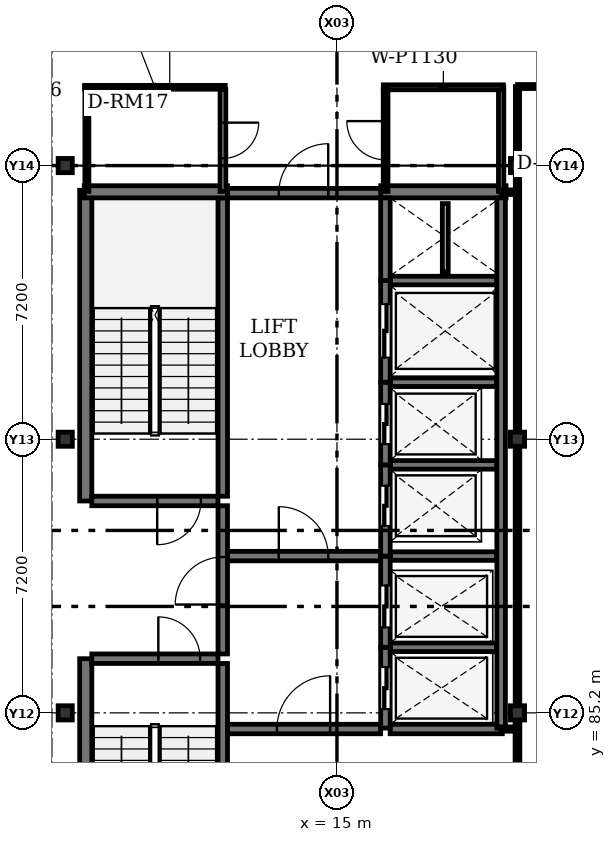
"""IFC4 building model, lengths in metres.
Left out: names, types, materials, properties, quantities, classifications, styles, units other than length and angle.
Written with IfcOpenShell. Run it as: python <this file> out.ifc"""

import sys

from ifc_helpers import new_model, si_unit, direction, frame, frame_2d, origin, origin_2d, place, context, subcontext, project, spatial, rectangle, i_section, extrude, element, fill, save


model = new_model("IFC4")
c1 = context("Model", 3, precision=1e-05, world=origin(), true_north=direction((0.0, 1.0)))
c2 = subcontext(c1, "Body", "Model", "MODEL_VIEW")
j1 = project(units=[si_unit("LENGTHUNIT", "METRE"), si_unit("PLANEANGLEUNIT", "RADIAN")], contexts=[c1])
p1 = place(None, origin())
s1 = spatial("IfcSite", under=j1, at=p1, CompositionType="ELEMENT")
p2 = place(p1, origin())
s2 = spatial("IfcBuilding", under=s1, at=p2, CompositionType="ELEMENT")
p3 = place(p2, frame((0.0, 0.0, 22.5)))
s3 = spatial("IfcBuildingStorey", under=s2, at=p3, CompositionType="ELEMENT", Elevation=22.5)
for number, where, z_axis, x_axis in (
    (1, (7.85, 85.2, 0.0), (0.0, 0.0, 1.0), (0.0, 1.0, 0.0)),
    (2, (19.75, 85.2, 0.0), (0.0, 0.0, 1.0), (0.0, 1.0, 0.0)),
    (3, (7.85, 92.4, 0.0), (0.0, 0.0, 1.0), (1.0, 0.0, 0.0)),
    (4, (19.75, 92.4, 0.0), (0.0, 0.0, 1.0), (1.0, 0.0, 0.0)),
    (5, (7.85, 99.6, 0.0), (0.0, 0.0, 1.0), (0.0, 1.0, 0.0)),
    (6, (19.75, 99.6, 0.0), (0.0, 0.0, 1.0), (0.0, 1.0, 0.0)),
):
    element("IfcColumn", number, at=place(p3, frame(where, z_axis=z_axis, x_axis=x_axis)), inside=s3, PredefinedType="COLUMN", context=c2, shape_type="SweptSolid", body=[
        extrude(i_section(OverallWidth=0.374, OverallDepth=0.372, WebThickness=0.016, FlangeThickness=0.026, FilletRadius=0.015, at=origin_2d()), origin(), (0.0, 0.0, 1.0), 4.2),
    ])
for number, where, z_axis, x_axis in (
    (7, (8.39, 78.45, 0.0), (0.0, 0.0, 1.0), (0.0, 1.0, 0.0)),
    (8, (8.39, 90.775, 0.0), (0.0, 0.0, 1.0), (0.0, 1.0, 0.0)),
):
    element("IfcWall", number, at=place(p3, frame(where, z_axis=z_axis, x_axis=x_axis)), inside=s3, PredefinedType="SHEAR", context=c2, shape_type="SweptSolid", body=[
        extrude(rectangle(XDim=8.175, YDim=0.32, at=frame_2d((4.087, 0.0))), origin(), (0.0, 0.0, 1.0), 4.2),
    ])
for number, where, z_axis, x_axis in (
    (9, (11.995, 78.65, 0.0), (0.0, 0.0, 1.0), (0.0, 1.0, 0.0)),
    (10, (11.995, 90.9, 0.0), (0.0, 0.0, 1.0), (0.0, 1.0, 0.0)),
):
    element("IfcWall", number, at=place(p3, frame(where, z_axis=z_axis, x_axis=x_axis)), inside=s3, PredefinedType="SHEAR", context=c2, shape_type="SweptSolid", body=[
        extrude(rectangle(XDim=7.85, YDim=0.25, at=frame_2d((3.925, 0.0))), origin(), (0.0, 0.0, 1.0), 4.2),
    ])
p4 = place(p3, frame((11.995, 86.75, 0.0), z_axis=(0.0, 0.0, 1.0), x_axis=(0.0, 1.0, 0.0)))
e11 = element("IfcWall", 11, at=p4, inside=s3, PredefinedType="SHEAR", context=c2, shape_type="SweptSolid", body=[
    extrude(rectangle(XDim=3.9, YDim=0.25, at=frame_2d((1.95, 0.0))), origin(), (0.0, 0.0, 1.0), 4.2),
])
p5 = place(p4, frame((1.3, 0.0, 0.0)))
e12 = element("IfcOpeningElement", 12, at=p5, cuts=e11, PredefinedType="OPENING", context=c2, shape_type="SweptSolid", body=[
    extrude(rectangle(XDim=1.25, YDim=2.2, at=frame_2d((0.625, 1.1))), frame((0.0, 0.125, 0.0), z_axis=(0.0, -1.0, 0.0), x_axis=(1.0, 0.0, 0.0)), (0.0, 0.0, 1.0), 0.25),
])
p6 = place(p3, frame((8.35, 98.91, 0.0), z_axis=(0.0, 0.0, 1.0), x_axis=(1.0, 0.0, 0.0)))
e13 = element("IfcWall", 13, at=p6, inside=s3, PredefinedType="SHEAR", context=c2, shape_type="SweptSolid", body=[
    extrude(rectangle(XDim=3.77, YDim=0.32, at=frame_2d((1.885, 0.0))), origin(), (0.0, 0.0, 1.0), 4.2),
])
p7 = place(p3, frame((16.15, 98.91, 0.0), z_axis=(0.0, 0.0, 1.0), x_axis=(1.0, 0.0, 0.0)))
e14 = element("IfcWall", 14, at=p7, inside=s3, PredefinedType="SHEAR", context=c2, shape_type="SweptSolid", body=[
    extrude(rectangle(XDim=3.3, YDim=0.32, at=frame_2d((1.65, 0.0))), origin(), (0.0, 0.0, 1.0), 4.2),
])
p8 = place(p3, frame((12.12, 98.875, 0.0), z_axis=(0.0, 0.0, 1.0), x_axis=(1.0, 0.0, 0.0)))
e15 = element("IfcWall", 15, at=p8, inside=s3, PredefinedType="SHEAR", context=c2, shape_type="SweptSolid", body=[
    extrude(rectangle(XDim=4.03, YDim=0.25, at=frame_2d((2.015, 0.0))), origin(), (0.0, 0.0, 1.0), 4.2),
])
p9 = place(p8, frame((1.35, 0.0, 0.0)))
e16 = element("IfcOpeningElement", 16, at=p9, cuts=e15, PredefinedType="OPENING", context=c2, shape_type="SweptSolid", body=[
    extrude(rectangle(XDim=1.3, YDim=2.2, at=frame_2d((0.65, 1.1))), frame((0.0, 0.125, 0.0), z_axis=(0.0, -1.0, 0.0), x_axis=(1.0, 0.0, 0.0)), (0.0, 0.0, 1.0), 0.25),
])
p10 = place(p3, frame((8.55, 86.625, 0.0), z_axis=(0.0, 0.0, 1.0), x_axis=(1.0, 0.0, 0.0)))
e17 = element("IfcWall", 17, at=p10, inside=s3, PredefinedType="SHEAR", context=c2, shape_type="SweptSolid", body=[
    extrude(rectangle(XDim=3.32, YDim=0.25, at=frame_2d((1.66, 0.0))), origin(), (0.0, 0.0, 1.0), 4.2),
])
p11 = place(p10, frame((1.75, 0.0, 0.0)))
e18 = element("IfcOpeningElement", 18, at=p11, cuts=e17, PredefinedType="OPENING", context=c2, shape_type="SweptSolid", body=[
    extrude(rectangle(XDim=1.1, YDim=2.15, at=frame_2d((0.55, 1.075))), frame((0.0, 0.125, 0.0), z_axis=(0.0, -1.0, 0.0), x_axis=(1.0, 0.0, 0.0)), (0.0, 0.0, 1.0), 0.25),
])
p12 = place(p3, frame((11.87, 90.775, 0.0), z_axis=(0.0, 0.0, 1.0), x_axis=(-1.0, 0.0, 0.0)))
e19 = element("IfcWall", 19, at=p12, inside=s3, PredefinedType="SHEAR", context=c2, shape_type="SweptSolid", body=[
    extrude(rectangle(XDim=3.32, YDim=0.25, at=frame_2d((1.66, 0.0))), origin(), (0.0, 0.0, 1.0), 4.2),
])
p13 = place(p12, frame((0.45, 0.0, 0.0)))
e20 = element("IfcOpeningElement", 20, at=p13, cuts=e19, PredefinedType="OPENING", context=c2, shape_type="SweptSolid", body=[
    extrude(rectangle(XDim=1.15, YDim=2.15, at=frame_2d((0.575, 1.075))), frame((0.0, 0.125, 0.0), z_axis=(0.0, -1.0, 0.0), x_axis=(1.0, 0.0, 0.0)), (0.0, 0.0, 1.0), 0.25),
])
p14 = place(p3, frame((12.12, 89.325, 0.0), z_axis=(0.0, 0.0, 1.0), x_axis=(1.0, 0.0, 0.0)))
e21 = element("IfcWall", 21, at=p14, inside=s3, PredefinedType="SHEAR", context=c2, shape_type="SweptSolid", body=[
    extrude(rectangle(XDim=4.03, YDim=0.25, at=frame_2d((2.015, 0.0))), origin(), (0.0, 0.0, 1.0), 4.2),
])
p15 = place(p14, frame((1.35, 0.0, 0.0)))
e22 = element("IfcOpeningElement", 22, at=p15, cuts=e21, PredefinedType="OPENING", context=c2, shape_type="SweptSolid", body=[
    extrude(rectangle(XDim=1.3, YDim=2.2, at=frame_2d((0.65, 1.1))), frame((0.0, 0.125, 0.0), z_axis=(0.0, -1.0, 0.0), x_axis=(1.0, 0.0, 0.0)), (0.0, 0.0, 1.0), 0.25),
])
p16 = place(p3, frame((12.12, 84.775, 0.0), z_axis=(0.0, 0.0, 1.0), x_axis=(1.0, 0.0, 0.0)))
e23 = element("IfcWall", 23, at=p16, inside=s3, PredefinedType="SHEAR", context=c2, shape_type="SweptSolid", body=[
    extrude(rectangle(XDim=4.03, YDim=0.25, at=frame_2d((2.015, 0.0))), origin(), (0.0, 0.0, 1.0), 4.2),
])
p17 = place(p16, frame((1.3, 0.0, 0.0)))
e24 = element("IfcOpeningElement", 24, at=p17, cuts=e23, PredefinedType="OPENING", context=c2, shape_type="SweptSolid", body=[
    extrude(rectangle(XDim=1.4, YDim=2.25, at=frame_2d((0.7, 1.125))), frame((0.0, 0.125, 0.0), z_axis=(0.0, -1.0, 0.0), x_axis=(1.0, 0.0, 0.0)), (0.0, 0.0, 1.0), 0.25),
])
p18 = place(p3, frame((16.4, 84.775, 0.0), z_axis=(0.0, 0.0, 1.0), x_axis=(1.0, 0.0, 0.0)))
e25 = element("IfcWall", 25, at=p18, inside=s3, PredefinedType="SHEAR", context=c2, shape_type="SweptSolid", body=[
    extrude(rectangle(XDim=2.95, YDim=0.25, at=frame_2d((1.475, 0.0))), origin(), (0.0, 0.0, 1.0), 4.2),
])
p19 = place(p3, frame((19.32, 84.8, 0.0), z_axis=(0.0, 0.0, 1.0), x_axis=(0.0, 1.0, 0.0)))
e26 = element("IfcWall", 26, at=p19, inside=s3, PredefinedType="SHEAR", context=c2, shape_type="SweptSolid", body=[
    extrude(rectangle(XDim=13.95, YDim=0.225, at=frame_2d((6.975, 0.0))), origin(), (0.0, 0.0, 1.0), 4.2),
])
for number, where, z_axis, x_axis in (
    (27, (16.4, 86.925, 0.0), (0.0, 0.0, 1.0), (1.0, 0.0, 0.0)),
    (28, (16.4, 89.325, 0.0), (0.0, 0.0, 1.0), (1.0, 0.0, 0.0)),
    (29, (16.4, 91.725, 0.0), (0.0, 0.0, 1.0), (1.0, 0.0, 0.0)),
    (30, (16.4, 93.9, 0.0), (0.0, 0.0, 1.0), (1.0, 0.0, 0.0)),
    (31, (16.4, 96.575, 0.0), (0.0, 0.0, 1.0), (1.0, 0.0, 0.0)),
):
    element("IfcWall", number, at=place(p3, frame(where, z_axis=z_axis, x_axis=x_axis)), inside=s3, PredefinedType="SHEAR", context=c2, shape_type="SweptSolid", body=[
        extrude(rectangle(XDim=2.8, YDim=0.225, at=frame_2d((1.4, 0.0))), origin(), (0.0, 0.0, 1.0), 4.2),
    ])
p20 = place(p3, frame((16.275, 84.8, 0.0), z_axis=(0.0, 0.0, 1.0), x_axis=(0.0, 1.0, 0.0)))
e32 = element("IfcWall", 32, at=p20, inside=s3, PredefinedType="SHEAR", context=c2, shape_type="SweptSolid", body=[
    extrude(rectangle(XDim=2.125, YDim=0.25, at=frame_2d((1.062, 0.0))), origin(), (0.0, 0.0, 1.0), 4.2),
])
p21 = place(p20, frame((0.5, 0.0, 0.0)))
e33 = element("IfcOpeningElement", 33, at=p21, cuts=e32, PredefinedType="OPENING", context=c2, shape_type="SweptSolid", body=[
    extrude(rectangle(XDim=1.1, YDim=2.15, at=frame_2d((0.55, 1.075))), frame((0.0, 0.125, 0.0), z_axis=(0.0, -1.0, 0.0), x_axis=(1.0, 0.0, 0.0)), (0.0, 0.0, 1.0), 0.25),
])
p22 = place(p3, frame((16.275, 86.925, 0.0), z_axis=(0.0, 0.0, 1.0), x_axis=(0.0, 1.0, 0.0)))
e34 = element("IfcWall", 34, at=p22, inside=s3, PredefinedType="SHEAR", context=c2, shape_type="SweptSolid", body=[
    extrude(rectangle(XDim=2.4, YDim=0.25, at=frame_2d((1.2, 0.0))), origin(), (0.0, 0.0, 1.0), 4.2),
])
p23 = place(p22, frame((0.525, 0.0, 0.0)))
e35 = element("IfcOpeningElement", 35, at=p23, cuts=e34, PredefinedType="OPENING", context=c2, shape_type="SweptSolid", body=[
    extrude(rectangle(XDim=1.1, YDim=2.15, at=frame_2d((0.55, 1.075))), frame((0.0, 0.125, 0.0), z_axis=(0.0, -1.0, 0.0), x_axis=(1.0, 0.0, 0.0)), (0.0, 0.0, 1.0), 0.25),
])
p24 = place(p3, frame((16.275, 89.325, 0.0), z_axis=(0.0, 0.0, 1.0), x_axis=(0.0, 1.0, 0.0)))
e36 = element("IfcWall", 36, at=p24, inside=s3, PredefinedType="SHEAR", context=c2, shape_type="SweptSolid", body=[
    extrude(rectangle(XDim=2.4, YDim=0.25, at=frame_2d((1.2, 0.0))), origin(), (0.0, 0.0, 1.0), 4.2),
])
p25 = place(p24, frame((0.8, 0.0, 0.0)))
e37 = element("IfcOpeningElement", 37, at=p25, cuts=e36, PredefinedType="OPENING", context=c2, shape_type="SweptSolid", body=[
    extrude(rectangle(XDim=1.05, YDim=2.15, at=frame_2d((0.525, 1.075))), frame((0.0, 0.125, 0.0), z_axis=(0.0, -1.0, 0.0), x_axis=(1.0, 0.0, 0.0)), (0.0, 0.0, 1.0), 0.25),
])
p26 = place(p3, frame((16.275, 91.725, 0.0), z_axis=(0.0, 0.0, 1.0), x_axis=(0.0, 1.0, 0.0)))
e38 = element("IfcWall", 38, at=p26, inside=s3, PredefinedType="SHEAR", context=c2, shape_type="SweptSolid", body=[
    extrude(rectangle(XDim=2.175, YDim=0.25, at=frame_2d((1.087, 0.0))), origin(), (0.0, 0.0, 1.0), 4.2),
])
p27 = place(p26, frame((0.55, 0.0, 0.0)))
e39 = element("IfcOpeningElement", 39, at=p27, cuts=e38, PredefinedType="OPENING", context=c2, shape_type="SweptSolid", body=[
    extrude(rectangle(XDim=1.05, YDim=2.15, at=frame_2d((0.525, 1.075))), frame((0.0, 0.125, 0.0), z_axis=(0.0, -1.0, 0.0), x_axis=(1.0, 0.0, 0.0)), (0.0, 0.0, 1.0), 0.25),
])
p28 = place(p3, frame((16.275, 93.9, 0.0), z_axis=(0.0, 0.0, 1.0), x_axis=(0.0, 1.0, 0.0)))
e40 = element("IfcWall", 40, at=p28, inside=s3, PredefinedType="SHEAR", context=c2, shape_type="SweptSolid", body=[
    extrude(rectangle(XDim=2.675, YDim=0.25, at=frame_2d((1.337, 0.0))), origin(), (0.0, 0.0, 1.0), 4.2),
])
p29 = place(p28, frame((0.65, 0.0, 0.0)))
e41 = element("IfcOpeningElement", 41, at=p29, cuts=e40, PredefinedType="OPENING", context=c2, shape_type="SweptSolid", body=[
    extrude(rectangle(XDim=1.4, YDim=2.25, at=frame_2d((0.7, 1.125))), frame((0.0, 0.125, 0.0), z_axis=(0.0, -1.0, 0.0), x_axis=(1.0, 0.0, 0.0)), (0.0, 0.0, 1.0), 0.25),
])
p30 = place(p3, frame((16.275, 96.575, 0.0), z_axis=(0.0, 0.0, 1.0), x_axis=(0.0, 1.0, 0.0)))
e42 = element("IfcWall", 42, at=p30, inside=s3, PredefinedType="SHEAR", context=c2, shape_type="SweptSolid", body=[
    extrude(rectangle(XDim=2.175, YDim=0.25, at=frame_2d((1.087, 0.0))), origin(), (0.0, 0.0, 1.0), 4.2),
])
p31 = place(p3, frame((17.85, 96.8, 0.0), z_axis=(0.0, 0.0, 1.0), x_axis=(0.0, 1.0, 0.0)))
e43 = element("IfcWall", 43, at=p31, inside=s3, PredefinedType="PLUMBINGWALL", context=c2, shape_type="SweptSolid", body=[
    extrude(rectangle(XDim=1.8, YDim=0.155, at=frame_2d((0.9, 0.0))), origin(), (0.0, 0.0, 1.0), 4.2),
])
p32 = place(p3, frame((8.42, 98.92, 0.0), z_axis=(0.0, 0.0, 1.0), x_axis=(0.0, 1.0, 0.0)))
e44 = element("IfcWall", 44, at=p32, inside=s3, PredefinedType="PARTITIONING", context=c2, shape_type="SweptSolid", body=[
    extrude(rectangle(XDim=2.74, YDim=0.105, at=frame_2d((1.37, 0.0))), origin(), (0.0, 0.0, 1.0), 3.277),
])
p33 = place(p3, frame((8.36, 101.66, 0.0), z_axis=(0.0, 0.0, 1.0), x_axis=(1.0, 0.0, 0.0)))
e45 = element("IfcWall", 45, at=p33, inside=s3, PredefinedType="PARTITIONING", context=c2, shape_type="SweptSolid", body=[
    extrude(rectangle(XDim=3.7, YDim=0.1, at=frame_2d((1.85, 0.0))), origin(), (0.0, 0.0, 1.0), 3.95),
])
p34 = place(p3, frame((12.0, 101.6, 0.0), z_axis=(0.0, 0.0, 1.0), x_axis=(0.0, -1.0, 0.0)))
e46 = element("IfcWall", 46, at=p34, inside=s3, PredefinedType="PARTITIONING", context=c2, shape_type="SweptSolid", body=[
    extrude(rectangle(XDim=2.68, YDim=0.15, at=frame_2d((1.34, 0.0))), origin(), (0.0, 0.0, 1.0), 3.277),
])
p35 = place(p34, frame((0.87, 0.0, 0.0)))
e47 = element("IfcOpeningElement", 47, at=p35, cuts=e46, PredefinedType="OPENING", context=c2, shape_type="SweptSolid", body=[
    extrude(rectangle(XDim=0.94, YDim=2.08, at=frame_2d((0.47, 1.04))), frame((0.0, 0.075, 0.0), z_axis=(0.0, -1.0, 0.0), x_axis=(1.0, 0.0, 0.0)), (0.0, 0.0, 1.0), 0.15),
])
p36 = place(p3, frame((19.32, 98.92, 0.0), z_axis=(0.0, 0.0, 1.0), x_axis=(0.0, 1.0, 0.0)))
e48 = element("IfcWall", 48, at=p36, inside=s3, PredefinedType="PARTITIONING", context=c2, shape_type="SweptSolid", body=[
    extrude(rectangle(XDim=2.74, YDim=0.14, at=frame_2d((1.37, 0.0))), origin(), (0.0, 0.0, 1.0), 3.277),
])
p37 = place(p3, frame((19.38, 101.66, 0.0), z_axis=(0.0, 0.0, 1.0), x_axis=(-1.0, 0.0, 0.0)))
e49 = element("IfcWall", 49, at=p37, inside=s3, PredefinedType="PARTITIONING", context=c2, shape_type="SweptSolid", body=[
    extrude(rectangle(XDim=3.16, YDim=0.13, at=frame_2d((1.58, 0.0))), origin(), (0.0, 0.0, 1.0), 3.95),
])
p38 = place(p3, frame((16.28, 98.92, 0.0), z_axis=(0.0, 0.0, 1.0), x_axis=(0.0, 1.0, 0.0)))
e50 = element("IfcWall", 50, at=p38, inside=s3, PredefinedType="PARTITIONING", context=c2, shape_type="SweptSolid", body=[
    extrude(rectangle(XDim=2.68, YDim=0.125, at=frame_2d((1.34, 0.0))), origin(), (0.0, 0.0, 1.0), 3.277),
])
p39 = place(p38, frame((0.83, 0.0, 0.0)))
e51 = element("IfcOpeningElement", 51, at=p39, cuts=e50, PredefinedType="OPENING", context=c2, shape_type="SweptSolid", body=[
    extrude(rectangle(XDim=1.02, YDim=2.08, at=frame_2d((0.51, 1.04))), frame((0.0, 0.062, 0.0), z_axis=(0.0, -1.0, 0.0), x_axis=(1.0, 0.0, 0.0)), (0.0, 0.0, 1.0), 0.125),
])
p40 = place(p3, frame((19.75, 98.9, 0.0), z_axis=(0.0, 0.0, 1.0), x_axis=(-1.0, 0.0, 0.0)))
e52 = element("IfcWall", 52, at=p40, inside=s3, PredefinedType="PARTITIONING", context=c2, shape_type="SweptSolid", body=[
    extrude(rectangle(XDim=0.43, YDim=0.12, at=frame_2d((0.215, 0.0))), origin(), (0.0, 0.0, 1.0), 3.507),
])
p41 = place(p3, frame((19.32, 84.775, 0.0), z_axis=(0.0, 0.0, 1.0), x_axis=(1.0, 0.0, 0.0)))
e53 = element("IfcWall", 53, at=p41, inside=s3, PredefinedType="PARTITIONING", context=c2, shape_type="SweptSolid", body=[
    extrude(rectangle(XDim=0.43, YDim=0.115, at=frame_2d((0.215, 0.0))), origin(), (0.0, 0.0, 1.0), 3.507),
])
p42 = place(p3, frame((19.75, 78.181, 0.0), z_axis=(0.0, 0.0, 1.0), x_axis=(0.0, 1.0, 0.0)))
e54 = element("IfcWall", 54, at=p42, inside=s3, PredefinedType="PARTITIONING", context=c2, shape_type="SweptSolid", body=[
    extrude(rectangle(XDim=6.837, YDim=0.125, at=frame_2d((3.418, 0.0))), origin(), (0.0, 0.0, 1.0), 3.507),
])
p43 = place(p3, frame((19.75, 85.382, 0.0), z_axis=(0.0, 0.0, 1.0), x_axis=(0.0, 1.0, 0.0)))
e55 = element("IfcWall", 55, at=p43, inside=s3, PredefinedType="PARTITIONING", context=c2, shape_type="SweptSolid", body=[
    extrude(rectangle(XDim=6.837, YDim=0.12, at=frame_2d((3.418, 0.0))), origin(), (0.0, 0.0, 1.0), 3.507),
])
p44 = place(p3, frame((19.75, 92.581, 0.0), z_axis=(0.0, 0.0, 1.0), x_axis=(0.0, 1.0, 0.0)))
e56 = element("IfcWall", 56, at=p44, inside=s3, PredefinedType="PARTITIONING", context=c2, shape_type="SweptSolid", body=[
    extrude(rectangle(XDim=6.837, YDim=0.115, at=frame_2d((3.418, 0.0))), origin(), (0.0, 0.0, 1.0), 3.507),
])
p45 = place(p3, frame((19.75, 99.782, 0.0), z_axis=(0.0, 0.0, 1.0), x_axis=(0.0, 1.0, 0.0)))
e57 = element("IfcWall", 57, at=p45, inside=s3, PredefinedType="PARTITIONING", context=c2, shape_type="SweptSolid", body=[
    extrude(rectangle(XDim=1.898, YDim=0.11, at=frame_2d((0.949, 0.0))), origin(), (0.0, 0.0, 1.0), 3.507),
])
p46 = place(p3, frame((19.75, 101.68, 0.0), z_axis=(0.0, 0.0, 1.0), x_axis=(1.0, 0.0, 0.0)))
e58 = element("IfcWall", 58, at=p46, inside=s3, PredefinedType="PARTITIONING", context=c2, shape_type="SweptSolid", body=[
    extrude(rectangle(XDim=7.915, YDim=0.105, at=frame_2d((3.958, 0.0))), origin(), (0.0, 0.0, 1.0), 3.507),
])
p47 = place(p46, frame((0.55, 0.0, 0.0)))
e59 = element("IfcOpeningElement", 59, at=p47, cuts=e58, PredefinedType="OPENING", context=c2, shape_type="SweptSolid", body=[
    extrude(rectangle(XDim=1.0, YDim=2.25, at=frame_2d((0.5, 1.125))), frame((0.0, 0.052, 0.0), z_axis=(0.0, -1.0, 0.0), x_axis=(1.0, 0.0, 0.0)), (0.0, 0.0, 1.0), 0.105),
])
p48 = place(p5, origin())
e60 = element("IfcDoor", 60, at=p48, inside=s3, OperationType="SINGLE_SWING_LEFT", PredefinedType="DOOR", context=c2, shape_type="SweptSolid", body=[
    extrude(rectangle(XDim=1.25, YDim=2.2, at=frame_2d((0.625, 1.1))), frame((0.0, 0.025, 0.0), z_axis=(0.0, -1.0, 0.0), x_axis=(1.0, 0.0, 0.0)), (0.0, 0.0, 1.0), 0.05),
])
fill(e12, e60)
p49 = place(p9, origin())
e61 = element("IfcDoor", 61, at=p49, inside=s3, OperationType="SINGLE_SWING_RIGHT", PredefinedType="DOOR", context=c2, shape_type="SweptSolid", body=[
    extrude(rectangle(XDim=1.3, YDim=2.2, at=frame_2d((0.65, 1.1))), frame((0.0, 0.025, 0.0), z_axis=(0.0, -1.0, 0.0), x_axis=(1.0, 0.0, 0.0)), (0.0, 0.0, 1.0), 0.05),
])
fill(e16, e61)
p50 = place(p11, origin())
e62 = element("IfcDoor", 62, at=p50, inside=s3, OperationType="SINGLE_SWING_LEFT", PredefinedType="DOOR", context=c2, shape_type="SweptSolid", body=[
    extrude(rectangle(XDim=1.1, YDim=2.15, at=frame_2d((0.55, 1.075))), frame((0.0, 0.025, 0.0), z_axis=(0.0, -1.0, 0.0), x_axis=(1.0, 0.0, 0.0)), (0.0, 0.0, 1.0), 0.05),
])
fill(e18, e62)
p51 = place(p13, origin())
e63 = element("IfcDoor", 63, at=p51, inside=s3, OperationType="SINGLE_SWING_RIGHT", PredefinedType="DOOR", context=c2, shape_type="SweptSolid", body=[
    extrude(rectangle(XDim=1.15, YDim=2.15, at=frame_2d((0.575, 1.075))), frame((0.0, 0.025, 0.0), z_axis=(0.0, -1.0, 0.0), x_axis=(1.0, 0.0, 0.0)), (0.0, 0.0, 1.0), 0.05),
])
fill(e20, e63)
p52 = place(p15, origin())
e64 = element("IfcDoor", 64, at=p52, inside=s3, OperationType="SINGLE_SWING_LEFT", PredefinedType="DOOR", context=c2, shape_type="SweptSolid", body=[
    extrude(rectangle(XDim=1.3, YDim=2.2, at=frame_2d((0.65, 1.1))), frame((0.0, 0.025, 0.0), z_axis=(0.0, -1.0, 0.0), x_axis=(1.0, 0.0, 0.0)), (0.0, 0.0, 1.0), 0.05),
])
fill(e22, e64)
p53 = place(p17, origin())
e65 = element("IfcDoor", 65, at=p53, inside=s3, OperationType="SINGLE_SWING_RIGHT", PredefinedType="DOOR", context=c2, shape_type="SweptSolid", body=[
    extrude(rectangle(XDim=1.4, YDim=2.25, at=frame_2d((0.7, 1.125))), frame((0.0, 0.025, 0.0), z_axis=(0.0, -1.0, 0.0), x_axis=(1.0, 0.0, 0.0)), (0.0, 0.0, 1.0), 0.05),
])
fill(e24, e65)
p54 = place(p21, origin())
e66 = element("IfcDoor", 66, at=p54, inside=s3, OperationType="SLIDING_TO_LEFT", PredefinedType="DOOR", context=c2, shape_type="SweptSolid", body=[
    extrude(rectangle(XDim=1.1, YDim=2.15, at=frame_2d((0.55, 1.075))), frame((0.0, 0.025, 0.0), z_axis=(0.0, -1.0, 0.0), x_axis=(1.0, 0.0, 0.0)), (0.0, 0.0, 1.0), 0.05),
])
fill(e33, e66)
p55 = place(p23, origin())
e67 = element("IfcDoor", 67, at=p55, inside=s3, OperationType="SLIDING_TO_LEFT", PredefinedType="DOOR", context=c2, shape_type="SweptSolid", body=[
    extrude(rectangle(XDim=1.1, YDim=2.15, at=frame_2d((0.55, 1.075))), frame((0.0, 0.025, 0.0), z_axis=(0.0, -1.0, 0.0), x_axis=(1.0, 0.0, 0.0)), (0.0, 0.0, 1.0), 0.05),
])
fill(e35, e67)
p56 = place(p25, origin())
e68 = element("IfcDoor", 68, at=p56, inside=s3, OperationType="SLIDING_TO_LEFT", PredefinedType="DOOR", context=c2, shape_type="SweptSolid", body=[
    extrude(rectangle(XDim=1.05, YDim=2.15, at=frame_2d((0.525, 1.075))), frame((0.0, 0.025, 0.0), z_axis=(0.0, -1.0, 0.0), x_axis=(1.0, 0.0, 0.0)), (0.0, 0.0, 1.0), 0.05),
])
fill(e37, e68)
p57 = place(p27, origin())
e69 = element("IfcDoor", 69, at=p57, inside=s3, OperationType="SLIDING_TO_LEFT", PredefinedType="DOOR", context=c2, shape_type="SweptSolid", body=[
    extrude(rectangle(XDim=1.05, YDim=2.15, at=frame_2d((0.525, 1.075))), frame((0.0, 0.025, 0.0), z_axis=(0.0, -1.0, 0.0), x_axis=(1.0, 0.0, 0.0)), (0.0, 0.0, 1.0), 0.05),
])
fill(e39, e69)
p58 = place(p29, origin())
e70 = element("IfcDoor", 70, at=p58, inside=s3, OperationType="SLIDING_TO_LEFT", PredefinedType="DOOR", context=c2, shape_type="SweptSolid", body=[
    extrude(rectangle(XDim=1.4, YDim=2.25, at=frame_2d((0.7, 1.125))), frame((0.0, 0.025, 0.0), z_axis=(0.0, -1.0, 0.0), x_axis=(1.0, 0.0, 0.0)), (0.0, 0.0, 1.0), 0.05),
])
fill(e41, e70)
p59 = place(p35, origin())
e71 = element("IfcDoor", 71, at=p59, inside=s3, OperationType="SINGLE_SWING_LEFT", PredefinedType="DOOR", context=c2, shape_type="SweptSolid", body=[
    extrude(rectangle(XDim=0.94, YDim=2.08, at=frame_2d((0.47, 1.04))), frame((0.0, 0.025, 0.0), z_axis=(0.0, -1.0, 0.0), x_axis=(1.0, 0.0, 0.0)), (0.0, 0.0, 1.0), 0.05),
])
fill(e47, e71)
p60 = place(p39, origin())
e72 = element("IfcDoor", 72, at=p60, inside=s3, OperationType="SINGLE_SWING_RIGHT", PredefinedType="DOOR", context=c2, shape_type="SweptSolid", body=[
    extrude(rectangle(XDim=1.02, YDim=2.08, at=frame_2d((0.51, 1.04))), frame((0.0, 0.025, 0.0), z_axis=(0.0, -1.0, 0.0), x_axis=(1.0, 0.0, 0.0)), (0.0, 0.0, 1.0), 0.05),
])
fill(e51, e72)
save(model, sys.argv[1])
